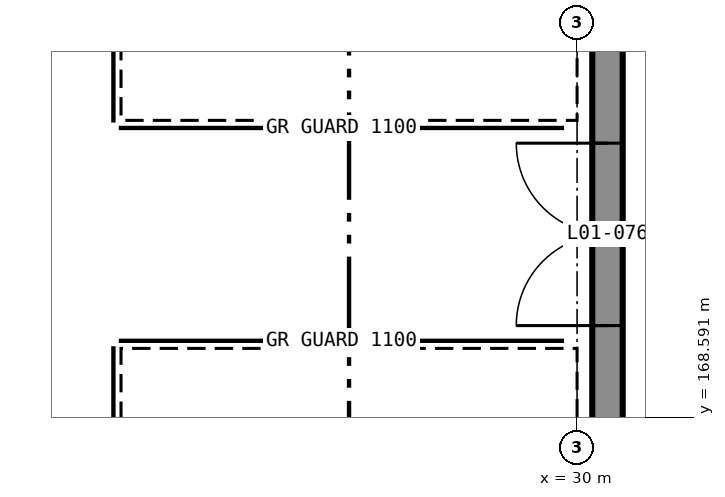
"""IFC4 building model, lengths in metres.
Left out: names, types, materials, properties, quantities, classifications, styles, units other than length and angle.
Written with IfcOpenShell. Run it as: python <this file> out.ifc"""

import sys

from ifc_helpers import new_model, si_unit, direction, frame, frame_2d, origin, place, context, subcontext, project, spatial, rectangle, extrude, element, fill, save


model = new_model("IFC4")
c1 = context("Model", 3, precision=1e-05, world=origin(), true_north=direction((0.0, 1.0)))
c2 = subcontext(c1, "Body", "Model", "MODEL_VIEW")
j1 = project(units=[si_unit("LENGTHUNIT", "METRE"), si_unit("PLANEANGLEUNIT", "RADIAN")], contexts=[c1])
p1 = place(None, origin())
s1 = spatial("IfcSite", under=j1, at=p1, CompositionType="ELEMENT")
p2 = place(p1, origin())
s2 = spatial("IfcBuilding", under=s1, at=p2, CompositionType="ELEMENT")
p3 = place(p2, frame((0.0, 0.0, 6.0)))
s3 = spatial("IfcBuildingStorey", under=s2, at=p3, CompositionType="ELEMENT", Elevation=6.0)
p4 = place(p3, frame((30.4, 162.5, 0.0), z_axis=(0.0, 0.0, 1.0), x_axis=(0.0, 1.0, 0.0)))
e1 = element("IfcWall", 1, at=p4, inside=s3, PredefinedType="SOLIDWALL", context=c2, shape_type="SweptSolid", body=[
    extrude(rectangle(XDim=11.0, YDim=0.4, at=frame_2d((5.5, 0.0))), origin(), (0.0, 0.0, 1.0), 6.0),
])
p5 = place(p4, frame((7.3, 0.0, 0.0)))
e2 = element("IfcOpeningElement", 2, at=p5, cuts=e1, PredefinedType="OPENING", context=c2, shape_type="SweptSolid", body=[
    extrude(rectangle(XDim=2.4, YDim=2.4, at=frame_2d((1.2, 1.2))), frame((0.0, 0.21, 0.0), z_axis=(0.0, -1.0, 0.0), x_axis=(1.0, 0.0, 0.0)), (0.0, 0.0, 1.0), 0.42),
])
p6 = place(p5, origin())
e3 = element("IfcDoor", 3, at=p6, inside=s3, OperationType="DOUBLE_DOOR_SINGLE_SWING", PredefinedType="DOOR", context=c2, shape_type="SweptSolid", body=[
    extrude(rectangle(XDim=2.4, YDim=2.4, at=frame_2d((1.2, 1.2))), frame((0.0, 0.025, 0.0), z_axis=(0.0, -1.0, 0.0), x_axis=(1.0, 0.0, 0.0)), (0.0, 0.0, 1.0), 0.05),
])
fill(e2, e3)
save(model, sys.argv[1])
